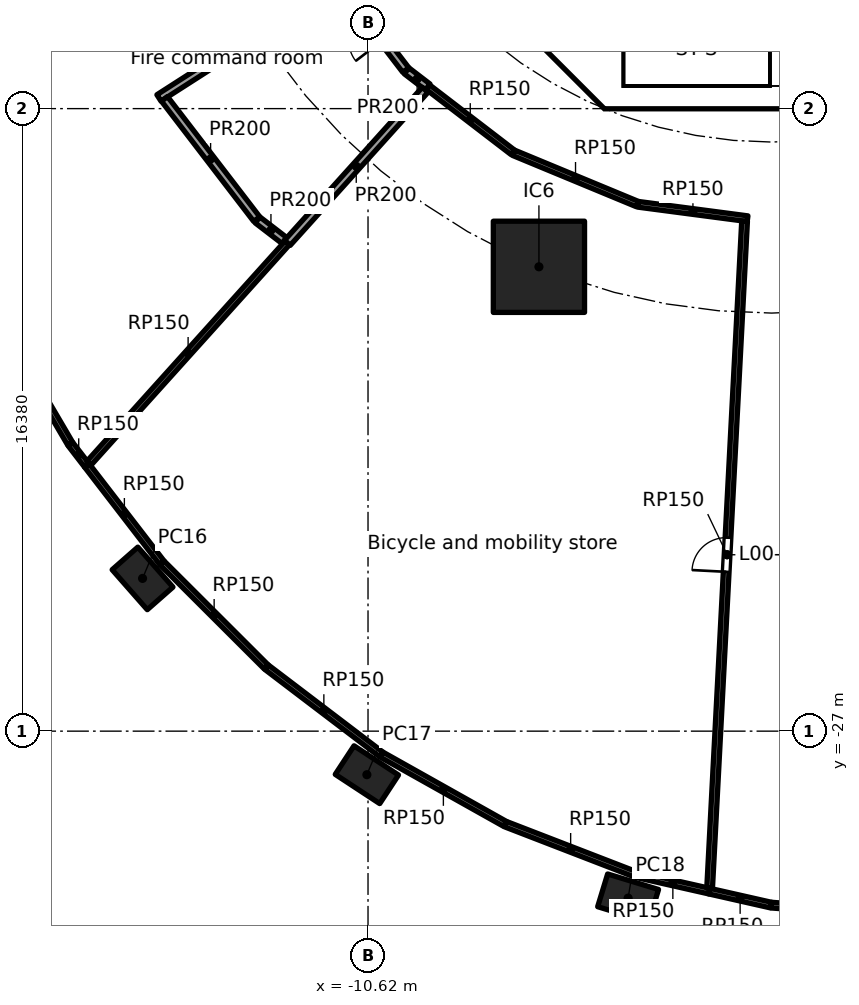
"""IFC4 building model, lengths in metres.
Left out: names, types, materials, properties, quantities, classifications, styles, units other than length and angle.
Written with IfcOpenShell. Run it as: python <this file> out.ifc"""

import sys

from ifc_helpers import new_model, si_unit, direction, frame, frame_2d, origin, origin_2d, place, context, subcontext, project, spatial, polyline, rectangle, hollow_rectangle, outline, extrude, element, fill, save


model = new_model("IFC4")
c1 = context("Model", 3, precision=1e-05, world=origin(), true_north=direction((0.0, 1.0)))
c2 = subcontext(c1, "Body", "Model", "MODEL_VIEW")
j1 = project(units=[si_unit("LENGTHUNIT", "METRE"), si_unit("PLANEANGLEUNIT", "RADIAN")], contexts=[c1])
p1 = place(None, origin())
s1 = spatial("IfcSite", under=j1, at=p1, CompositionType="ELEMENT")
p2 = place(p1, origin())
s2 = spatial("IfcBuilding", under=s1, at=p2, CompositionType="ELEMENT")
p3 = place(p2, origin())
s3 = spatial("IfcBuildingStorey", under=s2, at=p3, CompositionType="ELEMENT", Elevation=0.0)
for number, where, z_axis, x_axis in (
    (1, (-16.552, -22.981, 0.0), (0.0, 0.0, 1.0), (0.66, -0.751, 0.0)),
    (2, (-10.65, -28.146, 0.0), (0.0, 0.0, 1.0), (0.836, -0.549, 0.0)),
    (3, (-3.776, -31.393, 0.0), (0.0, 0.0, 1.0), (0.957, -0.292, 0.0)),
):
    element("IfcColumn", number, at=place(p3, frame(where, z_axis=z_axis, x_axis=x_axis)), inside=s3, PredefinedType="COLUMN", context=c2, shape_type="SweptSolid", body=[
        extrude(hollow_rectangle(XDim=1.4, YDim=0.9, WallThickness=0.05, at=origin_2d()), origin(), (0.0, 0.0, 1.0), 7.0),
    ])
p4 = place(p3, frame((-6.123, -14.782, 0.0), z_axis=(0.0, 0.0, 1.0), x_axis=(1.0, 0.0, 0.0)))
e4 = element("IfcColumn", 4, at=p4, inside=s3, PredefinedType="COLUMN", context=c2, shape_type="SweptSolid", body=[
    extrude(rectangle(XDim=2.4, YDim=2.4, at=origin_2d()), origin(), (0.0, 0.0, 1.0), 7.0),
])
p5 = place(p3, frame((-9.988, -4.613, 0.0), z_axis=(0.0, 0.0, 1.0), x_axis=(0.707106781187, -0.707106781187, 0.0)))
e5 = element("IfcWall", 5, at=p5, inside=s3, PredefinedType="SHEAR", context=c2, shape_type="SweptSolid", body=[
    extrude(rectangle(XDim=7.602, YDim=0.6, at=frame_2d((3.801, 0.0))), origin(), (0.0, 0.0, 1.0), 6.7),
])
p6 = place(p5, frame((6.151, 0.0, 0.0)))
e6 = element("IfcOpeningElement", 6, at=p6, cuts=e5, PredefinedType="OPENING", context=c2, shape_type="SweptSolid", body=[
    extrude(rectangle(XDim=1.1, YDim=2.1, at=frame_2d((0.55, 1.05))), frame((0.0, 0.31, 0.0), z_axis=(0.0, -1.0, 0.0), x_axis=(1.0, 0.0, 0.0)), (0.0, 0.0, 1.0), 0.62),
])
p7 = place(p3, frame((-3.801, -10.325, 0.0), z_axis=(0.0, 0.0, 1.0), x_axis=(1.0, 0.0, 0.0)))
e7 = element("IfcWall", 7, at=p7, inside=s3, PredefinedType="SHEAR", context=c2, shape_type="SweptSolid", body=[
    extrude(rectangle(XDim=7.602, YDim=0.6, at=frame_2d((3.801, 0.0))), origin(), (0.0, 0.0, 1.0), 6.7),
])
p8 = place(p7, frame((6.351, 0.0, 0.0)))
e8 = element("IfcOpeningElement", 8, at=p8, cuts=e7, PredefinedType="OPENING", context=c2, shape_type="SweptSolid", body=[
    extrude(rectangle(XDim=1.1, YDim=2.1, at=frame_2d((0.55, 1.05))), frame((0.0, 0.31, 0.0), z_axis=(0.0, -1.0, 0.0), x_axis=(1.0, 0.0, 0.0)), (0.0, 0.0, 1.0), 0.62),
])
p9 = place(p3, origin())
e9 = element("IfcWall", 9, at=p9, inside=s3, PredefinedType="SHEAR", context=c2, shape_type="SweptSolid", body=[
    extrude(outline(polyline([(-4.825, -10.2), (-4.401, -9.776), (-4.152, -10.025), (-3.801, -10.025), (-3.801, -10.625), (-4.401, -10.625), (-4.825, -10.2)])), origin(), (0.0, 0.0, 1.0), 6.7),
])
p10 = place(p3, origin())
e10 = element("IfcWall", 10, at=p10, inside=s3, PredefinedType="SOLIDWALL", context=c2, shape_type="SweptSolid", body=[
    extrude(outline(polyline([(-3.9, -10.025), (-4.1, -10.025), (-4.1, -7.025), (-3.9, -7.025), (-3.9, -10.025)])), origin(), (0.0, 0.0, 1.0), 6.7),
])
p11 = place(p3, frame((-18.456, -19.439, 0.0), z_axis=(0.0, 0.0, 1.0), x_axis=(-0.50633554765, 0.86233654288, 0.0)))
e11 = element("IfcWall", 11, at=p11, inside=s3, PredefinedType="PARTITIONING", context=c2, shape_type="SweptSolid", body=[
    extrude(rectangle(XDim=4.006, YDim=0.15, at=frame_2d((2.003, 0.0))), origin(), (0.0, 0.0, 1.0), 6.7),
])
p12 = place(p3, frame((-18.017, -20.01, 0.0), z_axis=(0.0, 0.0, 1.0), x_axis=(-0.610394995522, 0.792097184342, 0.0)))
e12 = element("IfcWall", 12, at=p12, inside=s3, PredefinedType="PARTITIONING", context=c2, shape_type="SweptSolid", body=[
    extrude(rectangle(XDim=0.707, YDim=0.15, at=frame_2d((0.354, 0.0))), origin(), (0.0, 0.0, 1.0), 6.7),
])
p13 = place(p3, frame((-16.045, -22.568, 0.0), z_axis=(0.0, 0.0, 1.0), x_axis=(-0.610433773772, 0.792067300069, 0.0)))
e13 = element("IfcWall", 13, at=p13, inside=s3, PredefinedType="PARTITIONING", context=c2, shape_type="SweptSolid", body=[
    extrude(rectangle(XDim=3.23, YDim=0.15, at=frame_2d((1.615, 0.0))), origin(), (0.0, 0.0, 1.0), 6.7),
])
p14 = place(p3, frame((-13.302, -25.307, 0.0), z_axis=(0.0, 0.0, 1.0), x_axis=(-0.707801601764, 0.706411277189, 0.0)))
e14 = element("IfcWall", 14, at=p14, inside=s3, PredefinedType="PARTITIONING", context=c2, shape_type="SweptSolid", body=[
    extrude(rectangle(XDim=3.863, YDim=0.15, at=frame_2d((1.932, 0.0))), origin(), (0.0, 0.0, 1.0), 6.7),
])
p15 = place(p3, frame((-12.742, -14.151, 0.0), z_axis=(0.0, 0.0, 1.0), x_axis=(-0.669109851661, -0.743163512566, 0.0)))
e15 = element("IfcWall", 15, at=p15, inside=s3, PredefinedType="PARTITIONING", context=c2, shape_type="SweptSolid", body=[
    extrude(rectangle(XDim=7.807, YDim=0.15, at=frame_2d((3.903, 0.0))), origin(), (0.0, 0.0, 1.0), 6.7),
])
p16 = place(p3, frame((-10.273, -27.611, 0.0), z_axis=(0.0, 0.0, 1.0), x_axis=(-0.795994629928, 0.60530368339, 0.0)))
e16 = element("IfcWall", 16, at=p16, inside=s3, PredefinedType="PARTITIONING", context=c2, shape_type="SweptSolid", body=[
    extrude(rectangle(XDim=3.791, YDim=0.15, at=frame_2d((1.896, 0.0))), origin(), (0.0, 0.0, 1.0), 6.7),
])
p17 = place(p3, frame((-9.05, -10.051, 0.0), z_axis=(0.0, 0.0, 1.0), x_axis=(0.793365630445, -0.608745411834, 0.0)))
e17 = element("IfcWall", 17, at=p17, inside=s3, PredefinedType="PARTITIONING", context=c2, shape_type="SweptSolid", body=[
    extrude(rectangle(XDim=2.825, YDim=0.15, at=frame_2d((1.412, 0.0))), origin(), (0.0, 0.0, 1.0), 6.7),
])
p18 = place(p3, frame((-7.013, -29.441, 0.0), z_axis=(0.0, 0.0, 1.0), x_axis=(-0.872065260979, 0.489389600005, 0.0)))
e18 = element("IfcWall", 18, at=p18, inside=s3, PredefinedType="PARTITIONING", context=c2, shape_type="SweptSolid", body=[
    extrude(rectangle(XDim=3.725, YDim=0.15, at=frame_2d((1.862, 0.0))), origin(), (0.0, 0.0, 1.0), 6.7),
])
p19 = place(p3, frame((-6.789, -11.782, 0.0), z_axis=(0.0, 0.0, 1.0), x_axis=(0.923881838111, -0.382677866108, 0.0)))
e19 = element("IfcWall", 19, at=p19, inside=s3, PredefinedType="PARTITIONING", context=c2, shape_type="SweptSolid", body=[
    extrude(rectangle(XDim=3.527, YDim=0.15, at=frame_2d((1.763, 0.0))), origin(), (0.0, 0.0, 1.0), 6.7),
])
p20 = place(p3, frame((-3.577, -30.77, 0.0), z_axis=(0.0, 0.0, 1.0), x_axis=(-0.932825072941, 0.360329548181, 0.0)))
e20 = element("IfcWall", 20, at=p20, inside=s3, PredefinedType="PARTITIONING", context=c2, shape_type="SweptSolid", body=[
    extrude(rectangle(XDim=3.67, YDim=0.15, at=frame_2d((1.835, 0.0))), origin(), (0.0, 0.0, 1.0), 6.7),
])
p21 = place(p3, frame((-3.508, -13.138, 0.0), z_axis=(0.0, 0.0, 1.0), x_axis=(0.991447129366, -0.130508963951, 0.0)))
e21 = element("IfcWall", 21, at=p21, inside=s3, PredefinedType="PARTITIONING", context=c2, shape_type="SweptSolid", body=[
    extrude(rectangle(XDim=2.9, YDim=0.15, at=frame_2d((1.45, 0.0))), origin(), (0.0, 0.0, 1.0), 6.7),
])
p22 = place(p3, frame((-1.636, -31.21, 0.0), z_axis=(0.0, 0.0, 1.0), x_axis=(-0.975336395286, 0.220723619105, 0.0)))
e22 = element("IfcWall", 22, at=p22, inside=s3, PredefinedType="PARTITIONING", context=c2, shape_type="SweptSolid", body=[
    extrude(rectangle(XDim=1.976, YDim=0.15, at=frame_2d((0.988, 0.0))), origin(), (0.0, 0.0, 1.0), 6.7),
])
p23 = place(p3, frame((-0.712, -13.582, 0.0), z_axis=(0.0, 0.0, 1.0), x_axis=(-0.052338659043, -0.998629393103, 0.0)))
e23 = element("IfcWall", 23, at=p23, inside=s3, PredefinedType="PARTITIONING", context=c2, shape_type="SweptSolid", body=[
    extrude(rectangle(XDim=17.576, YDim=0.15, at=frame_2d((8.788, 0.0))), origin(), (0.0, 0.0, 1.0), 6.7),
])
p24 = place(p23, frame((8.339, 0.0, 0.0)))
e24 = element("IfcOpeningElement", 24, at=p24, cuts=e23, PredefinedType="OPENING", context=c2, shape_type="SweptSolid", body=[
    extrude(rectangle(XDim=0.9, YDim=2.1, at=frame_2d((0.45, 1.05))), frame((0.0, 0.085, 0.0), z_axis=(0.0, -1.0, 0.0), x_axis=(1.0, 0.0, 0.0)), (0.0, 0.0, 1.0), 0.17),
])
p25 = place(p3, frame((-0.022, -31.575, 0.0), z_axis=(0.0, 0.0, 1.0), x_axis=(-0.975332482819, 0.220740906853, 0.0)))
e25 = element("IfcWall", 25, at=p25, inside=s3, PredefinedType="PARTITIONING", context=c2, shape_type="SweptSolid", body=[
    extrude(rectangle(XDim=1.655, YDim=0.15, at=frame_2d((0.827, 0.0))), origin(), (0.0, 0.0, 1.0), 6.7),
])
p26 = place(p3, frame((3.593, -31.846, 0.0), z_axis=(0.0, 0.0, 1.0), x_axis=(-0.997233506708, 0.074332584365, 0.0)))
e26 = element("IfcWall", 26, at=p26, inside=s3, PredefinedType="PARTITIONING", context=c2, shape_type="SweptSolid", body=[
    extrude(rectangle(XDim=3.61, YDim=0.15, at=frame_2d((1.805, 0.0))), origin(), (0.0, 0.0, 1.0), 6.7),
])
p27 = place(p26, frame((1.088, 0.0, 0.0)))
e27 = element("IfcOpeningElement", 27, at=p27, cuts=e26, PredefinedType="OPENING", context=c2, shape_type="SweptSolid", body=[
    extrude(rectangle(XDim=1.8, YDim=2.1, at=frame_2d((0.9, 1.05))), frame((0.0, 0.085, 0.0), z_axis=(0.0, -1.0, 0.0), x_axis=(1.0, 0.0, 0.0)), (0.0, 0.0, 1.0), 0.17),
])
p28 = place(p3, frame((-16.121, -10.339, 0.0), z_axis=(0.0, 0.0, 1.0), x_axis=(0.841785859203, 0.539811603474, 0.0)))
e28 = element("IfcWall", 28, at=p28, inside=s3, PredefinedType="PARTITIONING", context=c2, shape_type="SweptSolid", body=[
    extrude(rectangle(XDim=5.52, YDim=0.2, at=frame_2d((2.76, 0.0))), origin(), (0.0, 0.0, 1.0), 6.7),
])
p29 = place(p3, frame((-13.549, -13.527, 0.0), z_axis=(0.0, 0.0, 1.0), x_axis=(-0.608733632312, 0.793374668673, 0.0)))
e29 = element("IfcWall", 29, at=p29, inside=s3, PredefinedType="PARTITIONING", context=c2, shape_type="SweptSolid", body=[
    extrude(rectangle(XDim=3.987, YDim=0.2, at=frame_2d((1.993, 0.0))), origin(), (0.0, 0.0, 1.0), 6.7),
])
p30 = place(p3, frame((-12.822, -14.09, 0.0), z_axis=(0.0, 0.0, 1.0), x_axis=(-0.793398710545, 0.60870229678, 0.0)))
e30 = element("IfcWall", 30, at=p30, inside=s3, PredefinedType="PARTITIONING", context=c2, shape_type="SweptSolid", body=[
    extrude(rectangle(XDim=0.89, YDim=0.2, at=frame_2d((0.445, 0.0))), origin(), (0.0, 0.0, 1.0), 6.7),
])
p31 = place(p3, frame((-11.39, -7.305, 0.0), z_axis=(0.0, 0.0, 1.0), x_axis=(0.60873741789, -0.793371764094, 0.0)))
e31 = element("IfcWall", 31, at=p31, inside=s3, PredefinedType="PARTITIONING", context=c2, shape_type="SweptSolid", body=[
    extrude(rectangle(XDim=2.898, YDim=0.2, at=frame_2d((1.449, 0.0))), origin(), (0.0, 0.0, 1.0), 6.7),
])
p32 = place(p31, frame((1.007, 0.0, 0.0)))
e32 = element("IfcOpeningElement", 32, at=p32, cuts=e31, PredefinedType="OPENING", context=c2, shape_type="SweptSolid", body=[
    extrude(rectangle(XDim=0.9, YDim=2.1, at=frame_2d((0.45, 1.05))), frame((0.0, 0.11, 0.0), z_axis=(0.0, -1.0, 0.0), x_axis=(1.0, 0.0, 0.0)), (0.0, 0.0, 1.0), 0.22),
])
p33 = place(p3, frame((-9.605, -9.626, 0.0), z_axis=(0.0, 0.0, 1.0), x_axis=(0.793454504248, -0.608629566887, 0.0)))
e33 = element("IfcWall", 33, at=p33, inside=s3, PredefinedType="PARTITIONING", context=c2, shape_type="SweptSolid", body=[
    extrude(rectangle(XDim=0.699, YDim=0.2, at=frame_2d((0.349, 0.0))), origin(), (0.0, 0.0, 1.0), 6.7),
])
p34 = place(p3, frame((-9.117, -10.126, 0.0), z_axis=(0.0, 0.0, 1.0), x_axis=(-0.669134044303, -0.743141729925, 0.0)))
e34 = element("IfcWall", 34, at=p34, inside=s3, PredefinedType="PARTITIONING", context=c2, shape_type="SweptSolid", body=[
    extrude(rectangle(XDim=5.417, YDim=0.2, at=frame_2d((2.708, 0.0))), origin(), (0.0, 0.0, 1.0), 6.7),
])
p35 = place(p6, origin())
e35 = element("IfcDoor", 35, at=p35, inside=s3, OperationType="SINGLE_SWING_LEFT", PredefinedType="DOOR", context=c2, shape_type="SweptSolid", body=[
    extrude(rectangle(XDim=1.1, YDim=2.1, at=frame_2d((0.55, 1.05))), frame((0.0, 0.025, 0.0), z_axis=(0.0, -1.0, 0.0), x_axis=(1.0, 0.0, 0.0)), (0.0, 0.0, 1.0), 0.05),
])
fill(e6, e35)
p36 = place(p24, frame((0.9, 0.0, 0.0), x_axis=(-1.0, 0.0, 0.0)))
e36 = element("IfcDoor", 36, at=p36, inside=s3, OperationType="SINGLE_SWING_LEFT", PredefinedType="DOOR", context=c2, shape_type="SweptSolid", body=[
    extrude(rectangle(XDim=0.9, YDim=2.1, at=frame_2d((0.45, 1.05))), frame((0.0, 0.025, 0.0), z_axis=(0.0, -1.0, 0.0), x_axis=(1.0, 0.0, 0.0)), (0.0, 0.0, 1.0), 0.05),
])
fill(e24, e36)
save(model, sys.argv[1])
